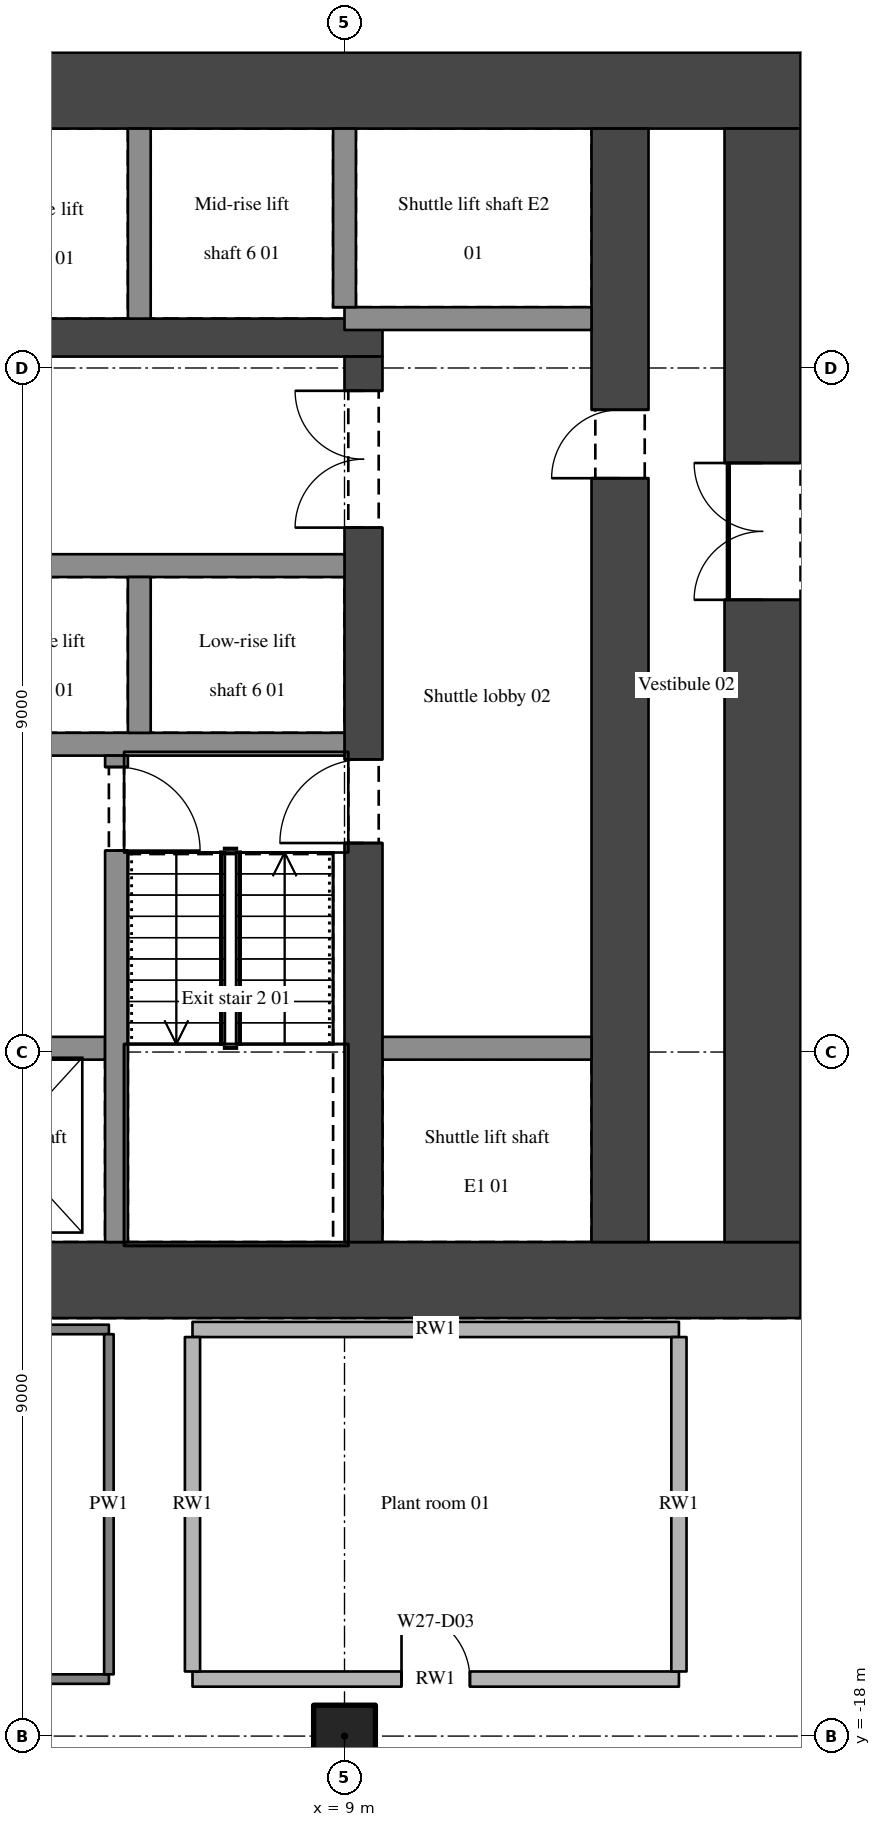
"""IFC4 building model, lengths in metres.
Left out: names, types, materials, properties, quantities, classifications, styles, units other than length and angle.
Written with IfcOpenShell. Run it as: python <this file> out.ifc"""

import sys

from ifc_helpers import new_model, si_unit, direction, frame, frame_2d, origin, origin_2d, place, context, subcontext, project, spatial, rectangle, hollow_circle, extrude, element, fill, save


model = new_model("IFC4")
c1 = context("Model", 3, precision=1e-05, world=origin(), true_north=direction((0.0, 1.0)))
c2 = subcontext(c1, "Body", "Model", "MODEL_VIEW")
j1 = project(units=[si_unit("LENGTHUNIT", "METRE"), si_unit("PLANEANGLEUNIT", "RADIAN")], contexts=[c1])
p1 = place(None, origin())
s1 = spatial("IfcSite", under=j1, at=p1, CompositionType="ELEMENT")
p2 = place(p1, origin())
s2 = spatial("IfcBuilding", under=s1, at=p2, CompositionType="ELEMENT")
p3 = place(p2, frame((0.0, 0.0, 114.3)))
s3 = spatial("IfcBuildingStorey", under=s2, at=p3, CompositionType="ELEMENT", Elevation=114.3)
p4 = place(p3, frame((9.0, -18.0, 0.0), z_axis=(0.0, 0.0, 1.0), x_axis=(1.0, 0.0, 0.0)))
e1 = element("IfcColumn", 1, at=p4, inside=s3, PredefinedType="COLUMN", context=c2, shape_type="SweptSolid", body=[
    extrude(hollow_circle(Radius=0.406, WallThickness=0.036, at=origin_2d()), origin(), (0.0, 0.0, 1.0), 6.78),
])
for number, where, z_axis, x_axis in (
    (2, (-15.0, -12.0, 0.0), (0.0, 0.0, 1.0), (1.0, 0.0, 0.0)),
    (3, (-15.0, 3.65, 0.0), (0.0, 0.0, 1.0), (1.0, 0.0, 0.0)),
):
    element("IfcWall", number, at=place(p3, frame(where, z_axis=z_axis, x_axis=x_axis)), inside=s3, PredefinedType="SHEAR", context=c2, shape_type="SweptSolid", body=[
        extrude(rectangle(XDim=30.0, YDim=1.0, at=frame_2d((15.0, 0.0))), origin(), (0.0, 0.0, 1.0), 7.2),
    ])
p5 = place(p3, frame((14.5, -11.5, 0.0), z_axis=(0.0, 0.0, 1.0), x_axis=(0.0, 1.0, 0.0)))
e4 = element("IfcWall", 4, at=p5, inside=s3, PredefinedType="SHEAR", context=c2, shape_type="SweptSolid", body=[
    extrude(rectangle(XDim=14.65, YDim=1.0, at=frame_2d((7.325, 0.0))), origin(), (0.0, 0.0, 1.0), 7.2),
])
p6 = place(p5, frame((8.45, 0.0, 0.0)))
e5 = element("IfcOpeningElement", 5, at=p6, cuts=e4, PredefinedType="OPENING", context=c2, shape_type="SweptSolid", body=[
    extrude(rectangle(XDim=1.8, YDim=2.1, at=frame_2d((0.9, 1.05))), frame((0.0, 0.51, 0.0), z_axis=(0.0, -1.0, 0.0), x_axis=(1.0, 0.0, 0.0)), (0.0, 0.0, 1.0), 1.02),
])
p7 = place(p3, frame((12.625, -11.5, 0.0), z_axis=(0.0, 0.0, 1.0), x_axis=(0.0, 1.0, 0.0)))
e6 = element("IfcWall", 6, at=p7, inside=s3, PredefinedType="SHEAR", context=c2, shape_type="SweptSolid", body=[
    extrude(rectangle(XDim=14.65, YDim=0.75, at=frame_2d((7.325, 0.0))), origin(), (0.0, 0.0, 1.0), 7.2),
])
p8 = place(p7, frame((10.05, 0.0, 0.0)))
e7 = element("IfcOpeningElement", 7, at=p8, cuts=e6, PredefinedType="OPENING", context=c2, shape_type="SweptSolid", body=[
    extrude(rectangle(XDim=0.9, YDim=2.1, at=frame_2d((0.45, 1.05))), frame((0.0, 0.385, 0.0), z_axis=(0.0, -1.0, 0.0), x_axis=(1.0, 0.0, 0.0)), (0.0, 0.0, 1.0), 0.77),
])
p9 = place(p3, frame((-9.5, 0.4, 0.0), z_axis=(0.0, 0.0, 1.0), x_axis=(1.0, 0.0, 0.0)))
e8 = element("IfcWall", 8, at=p9, inside=s3, PredefinedType="SHEAR", context=c2, shape_type="SweptSolid", body=[
    extrude(rectangle(XDim=19.0, YDim=0.5, at=frame_2d((9.5, 0.0))), origin(), (0.0, 0.0, 1.0), 7.2),
])
p10 = place(p3, frame((9.25, -11.5, 0.0), z_axis=(0.0, 0.0, 1.0), x_axis=(0.0, 1.0, 0.0)))
e9 = element("IfcWall", 9, at=p10, inside=s3, PredefinedType="SHEAR", context=c2, shape_type="SweptSolid", body=[
    extrude(rectangle(XDim=11.65, YDim=0.5, at=frame_2d((5.825, 0.0))), origin(), (0.0, 0.0, 1.0), 7.2),
])
p11 = place(p10, frame((9.4, 0.0, 0.0)))
e10 = element("IfcOpeningElement", 10, at=p11, cuts=e9, PredefinedType="OPENING", context=c2, shape_type="SweptSolid", body=[
    extrude(rectangle(XDim=1.8, YDim=2.1, at=frame_2d((0.9, 1.05))), frame((0.0, 0.26, 0.0), z_axis=(0.0, -1.0, 0.0), x_axis=(1.0, 0.0, 0.0)), (0.0, 0.0, 1.0), 0.52),
])
p12 = place(p10, frame((5.25, 0.0, 0.0)))
e11 = element("IfcOpeningElement", 11, at=p12, cuts=e9, PredefinedType="OPENING", context=c2, shape_type="SweptSolid", body=[
    extrude(rectangle(XDim=1.1, YDim=2.1, at=frame_2d((0.55, 1.05))), frame((0.0, 0.26, 0.0), z_axis=(0.0, -1.0, 0.0), x_axis=(1.0, 0.0, 0.0)), (0.0, 0.0, 1.0), 0.52),
])
p13 = place(p3, frame((-0.5, -17.25, 0.0), z_axis=(0.0, 0.0, 1.0), x_axis=(1.0, 0.0, 0.0)))
e12 = element("IfcWall", 12, at=p13, inside=s3, PredefinedType="PARTITIONING", context=c2, shape_type="SweptSolid", body=[
    extrude(rectangle(XDim=6.4, YDim=0.125, at=frame_2d((3.2, 0.0))), origin(), (0.0, 0.0, 1.0), 5.5),
])
p14 = place(p13, frame((2.25, 0.0, 0.0)))
e13 = element("IfcOpeningElement", 13, at=p14, cuts=e12, PredefinedType="OPENING", context=c2, shape_type="SweptSolid", body=[
    extrude(rectangle(XDim=0.9, YDim=2.1, at=frame_2d((0.45, 1.05))), frame((0.0, 0.073, 0.0), z_axis=(0.0, -1.0, 0.0), x_axis=(1.0, 0.0, 0.0)), (0.0, 0.0, 1.0), 0.145),
])
p15 = place(p3, frame((7.0, -17.25, 0.0), z_axis=(0.0, 0.0, 1.0), x_axis=(1.0, 0.0, 0.0)))
e14 = element("IfcWall", 14, at=p15, inside=s3, PredefinedType="SOLIDWALL", context=c2, shape_type="SweptSolid", body=[
    extrude(rectangle(XDim=6.4, YDim=0.2, at=frame_2d((3.2, 0.0))), origin(), (0.0, 0.0, 1.0), 5.5),
])
p16 = place(p15, frame((2.75, 0.0, 0.0)))
e15 = element("IfcOpeningElement", 15, at=p16, cuts=e14, PredefinedType="OPENING", context=c2, shape_type="SweptSolid", body=[
    extrude(rectangle(XDim=0.9, YDim=2.1, at=frame_2d((0.45, 1.05))), frame((0.0, 0.11, 0.0), z_axis=(0.0, -1.0, 0.0), x_axis=(1.0, 0.0, 0.0)), (0.0, 0.0, 1.0), 0.22),
])
p17 = place(p3, frame((-0.5, -12.65, 0.0), z_axis=(0.0, 0.0, 1.0), x_axis=(1.0, 0.0, 0.0)))
e16 = element("IfcWall", 16, at=p17, inside=s3, PredefinedType="PARTITIONING", context=c2, shape_type="SweptSolid", body=[
    extrude(rectangle(XDim=6.4, YDim=0.125, at=frame_2d((3.2, 0.0))), origin(), (0.0, 0.0, 1.0), 5.5),
])
p18 = place(p3, frame((7.0, -12.65, 0.0), z_axis=(0.0, 0.0, 1.0), x_axis=(1.0, 0.0, 0.0)))
e17 = element("IfcWall", 17, at=p18, inside=s3, PredefinedType="SOLIDWALL", context=c2, shape_type="SweptSolid", body=[
    extrude(rectangle(XDim=6.4, YDim=0.2, at=frame_2d((3.2, 0.0))), origin(), (0.0, 0.0, 1.0), 5.5),
])
p19 = place(p3, frame((-5.85, -8.95, 0.0), z_axis=(0.0, 0.0, 1.0), x_axis=(1.0, 0.0, 0.0)))
e18 = element("IfcWall", 18, at=p19, inside=s3, PredefinedType="SHEAR", context=c2, shape_type="SweptSolid", body=[
    extrude(rectangle(XDim=11.7, YDim=0.3, at=frame_2d((5.85, 0.0))), origin(), (0.0, 0.0, 1.0), 7.2),
])
p20 = place(p19, frame((0.8, 0.0, 0.0)))
e19 = element("IfcOpeningElement", 19, at=p20, cuts=e18, PredefinedType="OPENING", context=c2, shape_type="SweptSolid", body=[
    extrude(rectangle(XDim=1.1, YDim=2.1, at=frame_2d((0.55, 1.05))), frame((0.0, 0.16, 0.0), z_axis=(0.0, -1.0, 0.0), x_axis=(1.0, 0.0, 0.0)), (0.0, 0.0, 1.0), 0.32),
])
p21 = place(p19, frame((3.8, 0.0, 0.0)))
e20 = element("IfcOpeningElement", 20, at=p21, cuts=e18, PredefinedType="OPENING", context=c2, shape_type="SweptSolid", body=[
    extrude(rectangle(XDim=1.1, YDim=2.1, at=frame_2d((0.55, 1.05))), frame((0.0, 0.16, 0.0), z_axis=(0.0, -1.0, 0.0), x_axis=(1.0, 0.0, 0.0)), (0.0, 0.0, 1.0), 0.32),
])
p22 = place(p19, frame((6.8, 0.0, 0.0)))
e21 = element("IfcOpeningElement", 21, at=p22, cuts=e18, PredefinedType="OPENING", context=c2, shape_type="SweptSolid", body=[
    extrude(rectangle(XDim=1.1, YDim=2.1, at=frame_2d((0.55, 1.05))), frame((0.0, 0.16, 0.0), z_axis=(0.0, -1.0, 0.0), x_axis=(1.0, 0.0, 0.0)), (0.0, 0.0, 1.0), 0.32),
])
p23 = place(p19, frame((9.8, 0.0, 0.0)))
e22 = element("IfcOpeningElement", 22, at=p23, cuts=e18, PredefinedType="OPENING", context=c2, shape_type="SweptSolid", body=[
    extrude(rectangle(XDim=1.1, YDim=2.1, at=frame_2d((0.55, 1.05))), frame((0.0, 0.16, 0.0), z_axis=(0.0, -1.0, 0.0), x_axis=(1.0, 0.0, 0.0)), (0.0, 0.0, 1.0), 0.32),
])
p24 = place(p3, frame((9.5, -8.95, 0.0), z_axis=(0.0, 0.0, 1.0), x_axis=(1.0, 0.0, 0.0)))
e23 = element("IfcWall", 23, at=p24, inside=s3, PredefinedType="SHEAR", context=c2, shape_type="SweptSolid", body=[
    extrude(rectangle(XDim=2.75, YDim=0.3, at=frame_2d((1.375, 0.0))), origin(), (0.0, 0.0, 1.0), 7.2),
])
for number, where, z_axis, x_axis in (
    (24, (0.9, -4.95, 0.0), (0.0, 0.0, 1.0), (1.0, 0.0, 0.0)),
    (25, (0.9, -2.6, 0.0), (0.0, 0.0, 1.0), (1.0, 0.0, 0.0)),
):
    element("IfcWall", number, at=place(p3, frame(where, z_axis=z_axis, x_axis=x_axis)), inside=s3, PredefinedType="SHEAR", context=c2, shape_type="SweptSolid", body=[
        extrude(rectangle(XDim=8.1, YDim=0.3, at=frame_2d((4.05, 0.0))), origin(), (0.0, 0.0, 1.0), 7.2),
    ])
p25 = place(p3, frame((12.25, 0.65, 0.0), z_axis=(0.0, 0.0, 1.0), x_axis=(-1.0, 0.0, 0.0)))
e26 = element("IfcWall", 26, at=p25, inside=s3, PredefinedType="SHEAR", context=c2, shape_type="SweptSolid", body=[
    extrude(rectangle(XDim=3.25, YDim=0.3, at=frame_2d((1.625, 0.0))), origin(), (0.0, 0.0, 1.0), 7.2),
])
p26 = place(p3, frame((5.9, -17.188, 0.0), z_axis=(0.0, 0.0, 1.0), x_axis=(0.0, 1.0, 0.0)))
e27 = element("IfcWall", 27, at=p26, inside=s3, PredefinedType="PARTITIONING", context=c2, shape_type="SweptSolid", body=[
    extrude(rectangle(XDim=4.475, YDim=0.125, at=frame_2d((2.238, 0.0))), origin(), (0.0, 0.0, 1.0), 5.5),
])
p27 = place(p3, frame((6.0, -5.1, 0.0), z_axis=(0.0, 0.0, 1.0), x_axis=(0.0, -1.0, 0.0)))
e28 = element("IfcWall", 28, at=p27, inside=s3, PredefinedType="SHEAR", context=c2, shape_type="SweptSolid", body=[
    extrude(rectangle(XDim=6.4, YDim=0.3, at=frame_2d((3.2, 0.0))), origin(), (0.0, 0.0, 1.0), 7.2),
])
p28 = place(p27, frame((0.15, 0.0, 0.0)))
e29 = element("IfcOpeningElement", 29, at=p28, cuts=e28, PredefinedType="OPENING", context=c2, shape_type="SweptSolid", body=[
    extrude(rectangle(XDim=1.1, YDim=2.1, at=frame_2d((0.55, 1.05))), frame((0.0, 0.16, 0.0), z_axis=(0.0, -1.0, 0.0), x_axis=(1.0, 0.0, 0.0)), (0.0, 0.0, 1.0), 0.32),
])
p29 = place(p3, frame((6.3, -4.8, 0.0), z_axis=(0.0, 0.0, 1.0), x_axis=(0.0, 1.0, 0.0)))
e30 = element("IfcWall", 30, at=p29, inside=s3, PredefinedType="SHEAR", context=c2, shape_type="SweptSolid", body=[
    extrude(rectangle(XDim=2.05, YDim=0.3, at=frame_2d((1.025, 0.0))), origin(), (0.0, 0.0, 1.0), 7.2),
])
p30 = place(p3, frame((6.3, 0.65, 0.0), z_axis=(0.0, 0.0, 1.0), x_axis=(0.0, 1.0, 0.0)))
e31 = element("IfcWall", 31, at=p30, inside=s3, PredefinedType="SHEAR", context=c2, shape_type="SweptSolid", body=[
    extrude(rectangle(XDim=2.5, YDim=0.3, at=frame_2d((1.25, 0.0))), origin(), (0.0, 0.0, 1.0), 7.2),
])
p31 = place(p3, frame((7.0, -17.15, 0.0), z_axis=(0.0, 0.0, 1.0), x_axis=(0.0, 1.0, 0.0)))
e32 = element("IfcWall", 32, at=p31, inside=s3, PredefinedType="SOLIDWALL", context=c2, shape_type="SweptSolid", body=[
    extrude(rectangle(XDim=4.4, YDim=0.2, at=frame_2d((2.2, 0.0))), origin(), (0.0, 0.0, 1.0), 5.5),
])
p32 = place(p3, frame((9.0, 0.8, 0.0), z_axis=(0.0, 0.0, 1.0), x_axis=(0.0, 1.0, 0.0)))
e33 = element("IfcWall", 33, at=p32, inside=s3, PredefinedType="SHEAR", context=c2, shape_type="SweptSolid", body=[
    extrude(rectangle(XDim=2.35, YDim=0.3, at=frame_2d((1.175, 0.0))), origin(), (0.0, 0.0, 1.0), 7.2),
])
p33 = place(p3, frame((13.4, -17.15, 0.0), z_axis=(0.0, 0.0, 1.0), x_axis=(0.0, 1.0, 0.0)))
e34 = element("IfcWall", 34, at=p33, inside=s3, PredefinedType="SOLIDWALL", context=c2, shape_type="SweptSolid", body=[
    extrude(rectangle(XDim=4.4, YDim=0.2, at=frame_2d((2.2, 0.0))), origin(), (0.0, 0.0, 1.0), 5.5),
])
p34 = place(p11, origin())
e35 = element("IfcDoor", 35, at=p34, inside=s3, OperationType="DOUBLE_DOOR_SINGLE_SWING", PredefinedType="DOOR", context=c2, shape_type="SweptSolid", body=[
    extrude(rectangle(XDim=1.8, YDim=2.1, at=frame_2d((0.9, 1.05))), frame((0.0, 0.025, 0.0), z_axis=(0.0, -1.0, 0.0), x_axis=(1.0, 0.0, 0.0)), (0.0, 0.0, 1.0), 0.05),
])
fill(e10, e35)
p35 = place(p28, origin())
e36 = element("IfcDoor", 36, at=p35, inside=s3, OperationType="SINGLE_SWING_RIGHT", PredefinedType="DOOR", context=c2, shape_type="SweptSolid", body=[
    extrude(rectangle(XDim=1.1, YDim=2.1, at=frame_2d((0.55, 1.05))), frame((0.0, 0.025, 0.0), z_axis=(0.0, -1.0, 0.0), x_axis=(1.0, 0.0, 0.0)), (0.0, 0.0, 1.0), 0.05),
])
fill(e29, e36)
p36 = place(p12, origin())
e37 = element("IfcDoor", 37, at=p36, inside=s3, OperationType="SINGLE_SWING_LEFT", PredefinedType="DOOR", context=c2, shape_type="SweptSolid", body=[
    extrude(rectangle(XDim=1.1, YDim=2.1, at=frame_2d((0.55, 1.05))), frame((0.0, 0.025, 0.0), z_axis=(0.0, -1.0, 0.0), x_axis=(1.0, 0.0, 0.0)), (0.0, 0.0, 1.0), 0.05),
])
fill(e11, e37)
p37 = place(p16, origin())
e38 = element("IfcDoor", 38, at=p37, inside=s3, OperationType="SINGLE_SWING_LEFT", PredefinedType="DOOR", context=c2, shape_type="SweptSolid", body=[
    extrude(rectangle(XDim=0.9, YDim=2.1, at=frame_2d((0.45, 1.05))), frame((0.0, 0.025, 0.0), z_axis=(0.0, -1.0, 0.0), x_axis=(1.0, 0.0, 0.0)), (0.0, 0.0, 1.0), 0.05),
])
fill(e15, e38)
p38 = place(p8, origin())
e39 = element("IfcDoor", 39, at=p38, inside=s3, OperationType="SINGLE_SWING_LEFT", PredefinedType="DOOR", context=c2, shape_type="SweptSolid", body=[
    extrude(rectangle(XDim=0.9, YDim=2.1, at=frame_2d((0.45, 1.05))), frame((0.0, 0.025, 0.0), z_axis=(0.0, -1.0, 0.0), x_axis=(1.0, 0.0, 0.0)), (0.0, 0.0, 1.0), 0.05),
])
fill(e7, e39)
p39 = place(p6, origin())
e40 = element("IfcDoor", 40, at=p39, inside=s3, OperationType="DOUBLE_DOOR_SINGLE_SWING", PredefinedType="DOOR", context=c2, shape_type="SweptSolid", body=[
    extrude(rectangle(XDim=1.8, YDim=2.1, at=frame_2d((0.9, 1.05))), frame((0.0, 0.025, 0.0), z_axis=(0.0, -1.0, 0.0), x_axis=(1.0, 0.0, 0.0)), (0.0, 0.0, 1.0), 0.05),
])
fill(e5, e40)
save(model, sys.argv[1])
